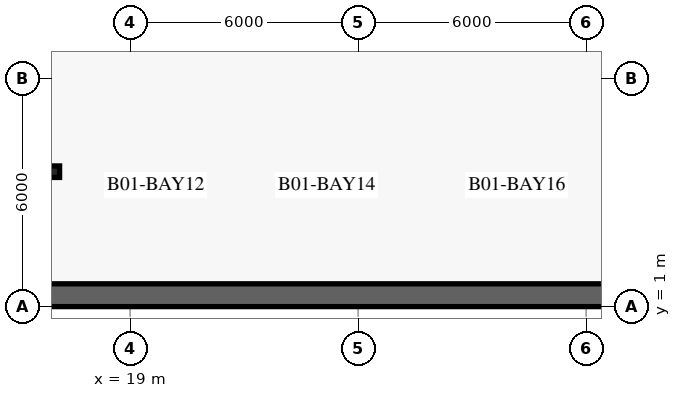
"""IFC4 building model, lengths in metres.
Left out: names, types, materials, properties, quantities, classifications, styles, units other than length and angle.
Written with IfcOpenShell. Run it as: python <this file> out.ifc"""

import sys

from ifc_helpers import new_model, si_unit, direction, frame, frame_2d, origin, place, context, subcontext, project, spatial, rectangle, extrude, element, save


model = new_model("IFC4")
c1 = context("Model", 3, precision=1e-05, world=origin(), true_north=direction((0.0, 1.0)))
c2 = subcontext(c1, "Body", "Model", "MODEL_VIEW")
j1 = project(units=[si_unit("LENGTHUNIT", "METRE"), si_unit("PLANEANGLEUNIT", "RADIAN")], contexts=[c1])
p1 = place(None, origin())
s1 = spatial("IfcSite", under=j1, at=p1, CompositionType="ELEMENT")
p2 = place(p1, origin())
s2 = spatial("IfcBuilding", under=s1, at=p2, CompositionType="ELEMENT")
p3 = place(p2, frame((0.0, 0.0, -4.2)))
s3 = spatial("IfcBuildingStorey", under=s2, at=p3, CompositionType="ELEMENT", Elevation=-4.2)
p4 = place(p3, frame((1.0, 1.3, 0.0), z_axis=(0.0, 0.0, 1.0), x_axis=(1.0, 0.0, 0.0)))
e1 = element("IfcWall", 1, at=p4, inside=s3, PredefinedType="USERDEFINED", context=c2, shape_type="SweptSolid", body=[
    extrude(rectangle(XDim=74.0, YDim=0.6, at=frame_2d((37.0, 0.0))), origin(), (0.0, 0.0, 1.0), 3.88),
])
save(model, sys.argv[1])
